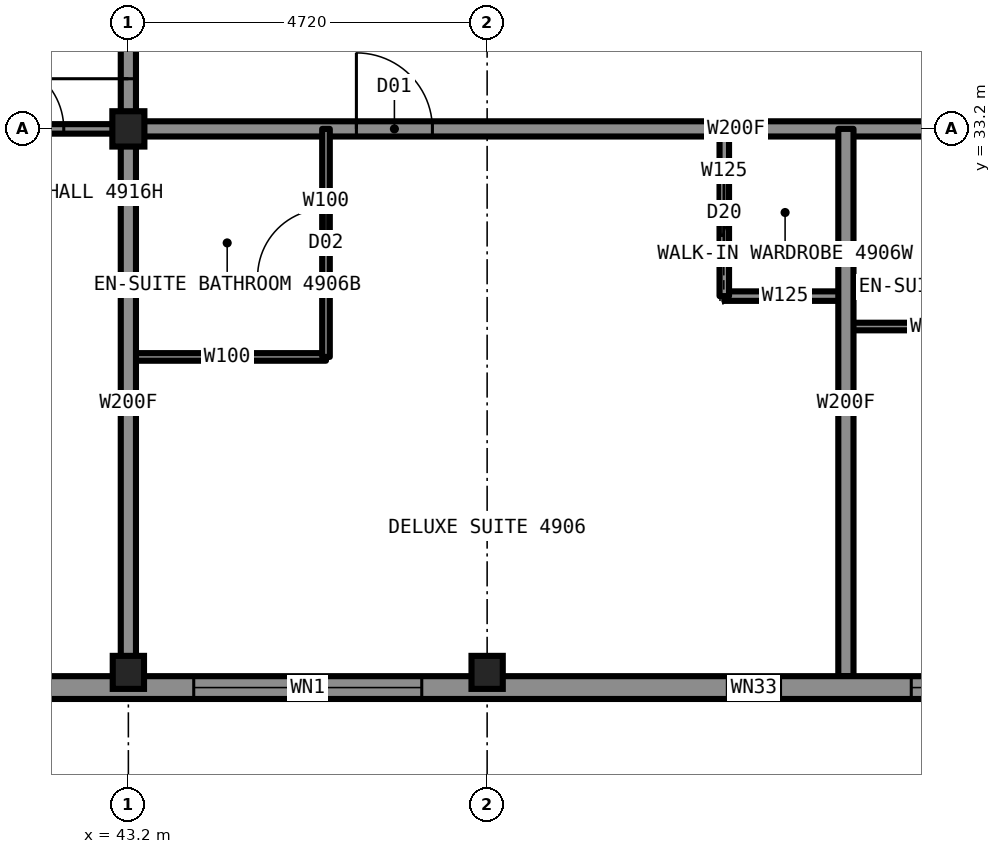
"""IFC4 building model, lengths in metres.
Left out: names, types, materials, properties, quantities, classifications, styles, units other than length and angle.
Written with IfcOpenShell. Run it as: python <this file> out.ifc"""

import sys

from ifc_helpers import new_model, si_unit, direction, frame, frame_2d, origin, origin_2d, place, context, subcontext, project, spatial, rectangle, i_section, extrude, element, fill, save


model = new_model("IFC4")
c1 = context("Model", 3, precision=1e-05, world=origin(), true_north=direction((0.0, 1.0)))
c2 = subcontext(c1, "Body", "Model", "MODEL_VIEW")
j1 = project(units=[si_unit("LENGTHUNIT", "METRE"), si_unit("PLANEANGLEUNIT", "RADIAN")], contexts=[c1])
p1 = place(None, origin())
s1 = spatial("IfcSite", under=j1, at=p1, CompositionType="ELEMENT")
p2 = place(p1, origin())
s2 = spatial("IfcBuilding", under=s1, at=p2, CompositionType="ELEMENT")
p3 = place(p2, frame((0.0, 0.0, 182.8)))
s3 = spatial("IfcBuildingStorey", under=s2, at=p3, CompositionType="ELEMENT", Elevation=182.8)
for number, where, z_axis, x_axis in (
    (1, (43.2, 26.05, 0.0), (0.0, 0.0, 1.0), (1.0, 0.0, 0.0)),
    (2, (47.92, 26.05, 0.0), (0.0, 0.0, 1.0), (1.0, 0.0, 0.0)),
):
    element("IfcColumn", number, at=place(p3, frame(where, z_axis=z_axis, x_axis=x_axis)), inside=s3, PredefinedType="COLUMN", context=c2, shape_type="SweptSolid", body=[
        extrude(i_section(OverallWidth=0.411, OverallDepth=0.434, WebThickness=0.036, FlangeThickness=0.057, at=origin_2d()), origin(), (0.0, 0.0, 1.0), 3.5),
    ])
p4 = place(p3, frame((43.2, 33.2, 0.0), z_axis=(0.0, 0.0, 1.0), x_axis=(1.0, 0.0, 0.0)))
e3 = element("IfcColumn", 3, at=p4, inside=s3, PredefinedType="COLUMN", context=c2, shape_type="SweptSolid", body=[
    extrude(i_section(OverallWidth=0.422, OverallDepth=0.465, WebThickness=0.045, FlangeThickness=0.073, at=origin_2d()), origin(), (0.0, 0.0, 1.0), 3.5),
])
p5 = place(p3, frame((43.2, 33.2, 0.0), z_axis=(0.0, 0.0, 1.0), x_axis=(1.0, 0.0, 0.0)))
e4 = element("IfcWall", 4, at=p5, inside=s3, PredefinedType="PARTITIONING", context=c2, shape_type="SweptSolid", body=[
    extrude(rectangle(XDim=23.6, YDim=0.2, at=frame_2d((11.8, 0.0))), origin(), (0.0, 0.0, 1.0), 3.33),
])
p6 = place(p5, frame((3.0, 0.0, 0.0)))
e5 = element("IfcOpeningElement", 5, at=p6, cuts=e4, PredefinedType="OPENING", context=c2, shape_type="SweptSolid", body=[
    extrude(rectangle(XDim=1.0, YDim=2.2, at=frame_2d((0.5, 1.1))), frame((0.0, 0.11, 0.0), z_axis=(0.0, -1.0, 0.0), x_axis=(1.0, 0.0, 0.0)), (0.0, 0.0, 1.0), 0.22),
])
p7 = place(p5, frame((11.99, 0.0, 0.0)))
e6 = element("IfcOpeningElement", 6, at=p7, cuts=e4, PredefinedType="OPENING", context=c2, shape_type="SweptSolid", body=[
    extrude(rectangle(XDim=1.0, YDim=2.2, at=frame_2d((0.5, 1.1))), frame((0.0, 0.11, 0.0), z_axis=(0.0, -1.0, 0.0), x_axis=(1.0, 0.0, 0.0)), (0.0, 0.0, 1.0), 0.22),
])
p8 = place(p5, frame((16.71, 0.0, 0.0)))
e7 = element("IfcOpeningElement", 7, at=p8, cuts=e4, PredefinedType="OPENING", context=c2, shape_type="SweptSolid", body=[
    extrude(rectangle(XDim=1.0, YDim=2.2, at=frame_2d((0.5, 1.1))), frame((0.0, 0.11, 0.0), z_axis=(0.0, -1.0, 0.0), x_axis=(1.0, 0.0, 0.0)), (0.0, 0.0, 1.0), 0.22),
])
p9 = place(p5, frame((19.28, 0.0, 0.0)))
e8 = element("IfcOpeningElement", 8, at=p9, cuts=e4, PredefinedType="OPENING", context=c2, shape_type="SweptSolid", body=[
    extrude(rectangle(XDim=1.0, YDim=2.2, at=frame_2d((0.5, 1.1))), frame((0.0, 0.11, 0.0), z_axis=(0.0, -1.0, 0.0), x_axis=(1.0, 0.0, 0.0)), (0.0, 0.0, 1.0), 0.22),
])
p10 = place(p3, frame((36.0, 33.2, 0.0), z_axis=(0.0, 0.0, 1.0), x_axis=(1.0, 0.0, 0.0)))
e9 = element("IfcWall", 9, at=p10, inside=s3, PredefinedType="PARTITIONING", context=c2, shape_type="SweptSolid", body=[
    extrude(rectangle(XDim=7.2, YDim=0.125, at=frame_2d((3.6, 0.0))), origin(), (0.0, 0.0, 1.0), 2.573),
])
p11 = place(p10, frame((5.45, 0.0, 0.0)))
e10 = element("IfcOpeningElement", 10, at=p11, cuts=e9, PredefinedType="OPENING", context=c2, shape_type="SweptSolid", body=[
    extrude(rectangle(XDim=0.9, YDim=2.2, at=frame_2d((0.45, 1.1))), frame((0.0, 0.073, 0.0), z_axis=(0.0, -1.0, 0.0), x_axis=(1.0, 0.0, 0.0)), (0.0, 0.0, 1.0), 0.145),
])
p12 = place(p3, frame((51.04, 31.0, 0.0), z_axis=(0.0, 0.0, 1.0), x_axis=(1.0, 0.0, 0.0)))
e11 = element("IfcWall", 11, at=p12, inside=s3, PredefinedType="PARTITIONING", context=c2, shape_type="SweptSolid", body=[
    extrude(rectangle(XDim=1.6, YDim=0.125, at=frame_2d((0.8, 0.0))), origin(), (0.0, 0.0, 1.0), 3.33),
])
p13 = place(p3, frame((52.64, 30.6, 0.0), z_axis=(0.0, 0.0, 1.0), x_axis=(1.0, 0.0, 0.0)))
e12 = element("IfcWall", 12, at=p13, inside=s3, PredefinedType="PARTITIONING", context=c2, shape_type="SweptSolid", body=[
    extrude(rectangle(XDim=2.3, YDim=0.1, at=frame_2d((1.15, 0.0))), origin(), (0.0, 0.0, 1.0), 3.33),
])
p14 = place(p3, frame((43.2, 30.2, 0.0), z_axis=(0.0, 0.0, 1.0), x_axis=(1.0, 0.0, 0.0)))
e13 = element("IfcWall", 13, at=p14, inside=s3, PredefinedType="PARTITIONING", context=c2, shape_type="SweptSolid", body=[
    extrude(rectangle(XDim=2.6, YDim=0.1, at=frame_2d((1.3, 0.0))), origin(), (0.0, 0.0, 1.0), 3.33),
])
p15 = place(p3, frame((43.2, 33.2, 0.0), z_axis=(0.0, 0.0, 1.0), x_axis=(0.0, 1.0, 0.0)))
e14 = element("IfcWall", 14, at=p15, inside=s3, PredefinedType="PARTITIONING", context=c2, shape_type="SweptSolid", body=[
    extrude(rectangle(XDim=4.72, YDim=0.2, at=frame_2d((2.36, 0.0))), origin(), (0.0, 0.0, 1.0), 3.33),
])
p16 = place(p15, frame((0.66, 0.0, 0.0)))
e15 = element("IfcOpeningElement", 15, at=p16, cuts=e14, PredefinedType="OPENING", context=c2, shape_type="SweptSolid", body=[
    extrude(rectangle(XDim=1.1, YDim=2.2, at=frame_2d((0.55, 1.1))), frame((0.0, 0.11, 0.0), z_axis=(0.0, -1.0, 0.0), x_axis=(1.0, 0.0, 0.0)), (0.0, 0.0, 1.0), 0.22),
])
p17 = place(p3, frame((43.2, 26.0, 0.0), z_axis=(0.0, 0.0, 1.0), x_axis=(0.0, 1.0, 0.0)))
e16 = element("IfcWall", 16, at=p17, inside=s3, PredefinedType="PARTITIONING", context=c2, shape_type="SweptSolid", body=[
    extrude(rectangle(XDim=7.2, YDim=0.2, at=frame_2d((3.6, 0.0))), origin(), (0.0, 0.0, 1.0), 2.573),
])
p18 = place(p3, frame((52.64, 26.0, 0.0), z_axis=(0.0, 0.0, 1.0), x_axis=(0.0, 1.0, 0.0)))
e17 = element("IfcWall", 17, at=p18, inside=s3, PredefinedType="PARTITIONING", context=c2, shape_type="SweptSolid", body=[
    extrude(rectangle(XDim=7.2, YDim=0.2, at=frame_2d((3.6, 0.0))), origin(), (0.0, 0.0, 1.0), 3.33),
])
p19 = place(p3, frame((51.04, 31.0, 0.0), z_axis=(0.0, 0.0, 1.0), x_axis=(0.0, 1.0, 0.0)))
e18 = element("IfcWall", 18, at=p19, inside=s3, PredefinedType="PARTITIONING", context=c2, shape_type="SweptSolid", body=[
    extrude(rectangle(XDim=2.2, YDim=0.125, at=frame_2d((1.1, 0.0))), origin(), (0.0, 0.0, 1.0), 3.33),
])
p20 = place(p19, frame((0.7, 0.0, 0.0)))
e19 = element("IfcOpeningElement", 19, at=p20, cuts=e18, PredefinedType="OPENING", context=c2, shape_type="SweptSolid", body=[
    extrude(rectangle(XDim=0.8, YDim=2.1, at=frame_2d((0.4, 1.05))), frame((0.0, 0.073, 0.0), z_axis=(0.0, -1.0, 0.0), x_axis=(1.0, 0.0, 0.0)), (0.0, 0.0, 1.0), 0.145),
])
p21 = place(p3, frame((45.8, 30.2, 0.0), z_axis=(0.0, 0.0, 1.0), x_axis=(0.0, 1.0, 0.0)))
e20 = element("IfcWall", 20, at=p21, inside=s3, PredefinedType="PARTITIONING", context=c2, shape_type="SweptSolid", body=[
    extrude(rectangle(XDim=3.0, YDim=0.1, at=frame_2d((1.5, 0.0))), origin(), (0.0, 0.0, 1.0), 3.33),
])
p22 = place(p21, frame((1.05, 0.0, 0.0)))
e21 = element("IfcOpeningElement", 21, at=p22, cuts=e20, PredefinedType="OPENING", context=c2, shape_type="SweptSolid", body=[
    extrude(rectangle(XDim=0.9, YDim=2.1, at=frame_2d((0.45, 1.05))), frame((0.0, 0.06, 0.0), z_axis=(0.0, -1.0, 0.0), x_axis=(1.0, 0.0, 0.0)), (0.0, 0.0, 1.0), 0.12),
])
p23 = place(p3, frame((41.2, 25.85, 0.0), z_axis=(0.0, 0.0, 1.0), x_axis=(1.0, 0.0, 0.0)))
e22 = element("IfcWall", 22, at=p23, inside=s3, PredefinedType="SOLIDWALL", context=c2, shape_type="SweptSolid", body=[
    extrude(rectangle(XDim=27.6, YDim=0.3, at=frame_2d((13.8, 0.0))), origin(), (0.0, 0.0, 1.0), 2.83),
])
p24 = place(p23, frame((2.86, 0.0, 0.3)))
e23 = element("IfcOpeningElement", 23, at=p24, cuts=e22, PredefinedType="OPENING", context=c2, shape_type="SweptSolid", body=[
    extrude(rectangle(XDim=3.0, YDim=2.0, at=frame_2d((1.5, 1.0))), frame((0.0, 0.16, 0.0), z_axis=(0.0, -1.0, 0.0), x_axis=(1.0, 0.0, 0.0)), (0.0, 0.0, 1.0), 0.32),
])
p25 = place(p23, frame((9.88, 0.0, 0.3)))
e24 = element("IfcOpeningElement", 24, at=p25, cuts=e22, PredefinedType="OPENING", context=c2, shape_type="SweptSolid", body=[
    extrude(rectangle(XDim=0.7, YDim=1.1, at=frame_2d((0.35, 0.55))), frame((0.0, 0.16, 0.0), z_axis=(0.0, -1.0, 0.0), x_axis=(1.0, 0.0, 0.0)), (0.0, 0.0, 1.0), 0.32),
])
p26 = place(p23, frame((12.3, 0.0, 0.3)))
e25 = element("IfcOpeningElement", 25, at=p26, cuts=e22, PredefinedType="OPENING", context=c2, shape_type="SweptSolid", body=[
    extrude(rectangle(XDim=3.0, YDim=2.0, at=frame_2d((1.5, 1.0))), frame((0.0, 0.16, 0.0), z_axis=(0.0, -1.0, 0.0), x_axis=(1.0, 0.0, 0.0)), (0.0, 0.0, 1.0), 0.32),
])
p27 = place(p23, frame((17.02, 0.0, 0.3)))
e26 = element("IfcOpeningElement", 26, at=p27, cuts=e22, PredefinedType="OPENING", context=c2, shape_type="SweptSolid", body=[
    extrude(rectangle(XDim=0.7, YDim=1.1, at=frame_2d((0.35, 0.55))), frame((0.0, 0.16, 0.0), z_axis=(0.0, -1.0, 0.0), x_axis=(1.0, 0.0, 0.0)), (0.0, 0.0, 1.0), 0.32),
])
p28 = place(p23, frame((21.74, 0.0, 0.3)))
e27 = element("IfcOpeningElement", 27, at=p28, cuts=e22, PredefinedType="OPENING", context=c2, shape_type="SweptSolid", body=[
    extrude(rectangle(XDim=3.0, YDim=2.0, at=frame_2d((1.5, 1.0))), frame((0.0, 0.16, 0.0), z_axis=(0.0, -1.0, 0.0), x_axis=(1.0, 0.0, 0.0)), (0.0, 0.0, 1.0), 0.32),
])
p29 = place(p6, origin())
e28 = element("IfcDoor", 28, at=p29, inside=s3, OperationType="SINGLE_SWING_LEFT", PredefinedType="DOOR", context=c2, shape_type="SweptSolid", body=[
    extrude(rectangle(XDim=1.0, YDim=2.2, at=frame_2d((0.5, 1.1))), frame((0.0, 0.025, 0.0), z_axis=(0.0, -1.0, 0.0), x_axis=(1.0, 0.0, 0.0)), (0.0, 0.0, 1.0), 0.05),
])
fill(e5, e28)
p30 = place(p22, origin())
e29 = element("IfcDoor", 29, at=p30, inside=s3, OperationType="SINGLE_SWING_RIGHT", PredefinedType="DOOR", context=c2, shape_type="SweptSolid", body=[
    extrude(rectangle(XDim=0.9, YDim=2.1, at=frame_2d((0.45, 1.05))), frame((0.0, 0.025, 0.0), z_axis=(0.0, -1.0, 0.0), x_axis=(1.0, 0.0, 0.0)), (0.0, 0.0, 1.0), 0.05),
])
fill(e21, e29)
p31 = place(p20, origin())
e30 = element("IfcDoor", 30, at=p31, inside=s3, OperationType="SLIDING_TO_LEFT", PredefinedType="DOOR", context=c2, shape_type="SweptSolid", body=[
    extrude(rectangle(XDim=0.8, YDim=2.1, at=frame_2d((0.4, 1.05))), frame((0.0, 0.025, 0.0), z_axis=(0.0, -1.0, 0.0), x_axis=(1.0, 0.0, 0.0)), (0.0, 0.0, 1.0), 0.05),
])
fill(e19, e30)
p32 = place(p11, origin())
e31 = element("IfcDoor", 31, at=p32, inside=s3, OperationType="SINGLE_SWING_LEFT", PredefinedType="DOOR", context=c2, shape_type="SweptSolid", body=[
    extrude(rectangle(XDim=0.9, YDim=2.2, at=frame_2d((0.45, 1.1))), frame((0.0, 0.025, 0.0), z_axis=(0.0, -1.0, 0.0), x_axis=(1.0, 0.0, 0.0)), (0.0, 0.0, 1.0), 0.05),
])
fill(e10, e31)
p33 = place(p16, origin())
e32 = element("IfcDoor", 32, at=p33, inside=s3, OperationType="SINGLE_SWING_LEFT", PredefinedType="DOOR", context=c2, shape_type="SweptSolid", body=[
    extrude(rectangle(XDim=1.1, YDim=2.2, at=frame_2d((0.55, 1.1))), frame((0.0, 0.025, 0.0), z_axis=(0.0, -1.0, 0.0), x_axis=(1.0, 0.0, 0.0)), (0.0, 0.0, 1.0), 0.05),
])
fill(e15, e32)
p34 = place(p24, origin())
e33 = element("IfcWindow", 33, at=p34, inside=s3, PartitioningType="SINGLE_PANEL", PredefinedType="WINDOW", context=c2, shape_type="SweptSolid", body=[
    extrude(rectangle(XDim=3.0, YDim=2.0, at=frame_2d((1.5, 1.0))), frame((0.0, 0.13, 0.0), z_axis=(0.0, -1.0, 0.0), x_axis=(1.0, 0.0, 0.0)), (0.0, 0.0, 1.0), 0.06),
])
fill(e23, e33)
p35 = place(p25, origin())
e34 = element("IfcWindow", 34, at=p35, inside=s3, PartitioningType="SINGLE_PANEL", PredefinedType="WINDOW", context=c2, shape_type="SweptSolid", body=[
    extrude(rectangle(XDim=0.7, YDim=1.1, at=frame_2d((0.35, 0.55))), frame((0.0, 0.13, 0.0), z_axis=(0.0, -1.0, 0.0), x_axis=(1.0, 0.0, 0.0)), (0.0, 0.0, 1.0), 0.06),
])
fill(e24, e34)
p36 = place(p26, origin())
e35 = element("IfcWindow", 35, at=p36, inside=s3, PartitioningType="SINGLE_PANEL", PredefinedType="WINDOW", context=c2, shape_type="SweptSolid", body=[
    extrude(rectangle(XDim=3.0, YDim=2.0, at=frame_2d((1.5, 1.0))), frame((0.0, 0.13, 0.0), z_axis=(0.0, -1.0, 0.0), x_axis=(1.0, 0.0, 0.0)), (0.0, 0.0, 1.0), 0.06),
])
fill(e25, e35)
save(model, sys.argv[1])
